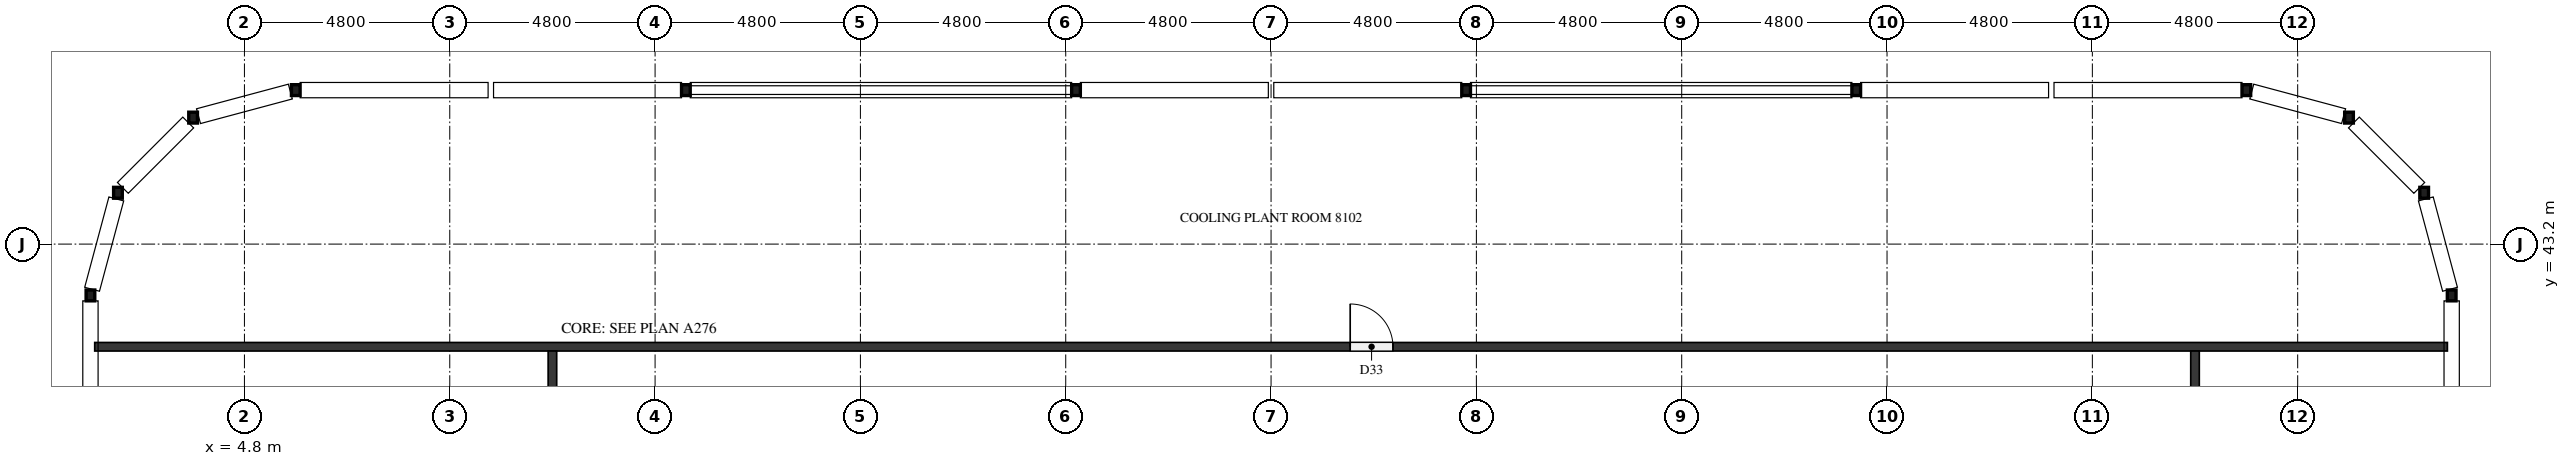
"""IFC4 building model, lengths in metres.
Left out: names, types, materials, properties, quantities, classifications, styles, units other than length and angle.
Written with IfcOpenShell. Run it as: python <this file> out.ifc"""

import sys

from ifc_helpers import new_model, si_unit, direction, frame, frame_2d, origin, origin_2d, place, context, subcontext, project, spatial, rectangle, hollow_rectangle, extrude, element, fill, save


model = new_model("IFC4")
c1 = context("Model", 3, precision=1e-05, world=origin(), true_north=direction((0.0, 1.0)))
c2 = subcontext(c1, "Body", "Model", "MODEL_VIEW")
j1 = project(units=[si_unit("LENGTHUNIT", "METRE"), si_unit("PLANEANGLEUNIT", "RADIAN")], contexts=[c1])
p1 = place(None, origin())
s1 = spatial("IfcSite", under=j1, at=p1, CompositionType="ELEMENT")
p2 = place(p1, origin())
s2 = spatial("IfcBuilding", under=s1, at=p2, CompositionType="ELEMENT")
p3 = place(p2, frame((0.0, 0.0, 314.3)))
s3 = spatial("IfcBuildingStorey", under=s2, at=p3, CompositionType="ELEMENT", Elevation=314.3)
for number, where, z_axis, x_axis in (
    (1, (56.4, 42.0, 0.0), (0.0, 0.0, 1.0), (1.0, 0.0, 0.0)),
    (2, (55.757, 44.4, 0.0), (0.0, 0.0, 1.0), (1.0, 0.0, 0.0)),
    (3, (54.0, 46.157, 0.0), (0.0, 0.0, 1.0), (1.0, 0.0, 0.0)),
    (4, (51.6, 46.8, 0.0), (0.0, 0.0, 1.0), (1.0, 0.0, 0.0)),
    (5, (42.48, 46.8, 0.0), (0.0, 0.0, 1.0), (1.0, 0.0, 0.0)),
    (6, (33.36, 46.8, 0.0), (0.0, 0.0, 1.0), (1.0, 0.0, 0.0)),
    (7, (24.24, 46.8, 0.0), (0.0, 0.0, 1.0), (1.0, 0.0, 0.0)),
    (8, (15.12, 46.8, 0.0), (0.0, 0.0, 1.0), (1.0, 0.0, 0.0)),
    (9, (6.0, 46.8, 0.0), (0.0, 0.0, 1.0), (1.0, 0.0, 0.0)),
    (10, (3.6, 46.157, 0.0), (0.0, 0.0, 1.0), (1.0, 0.0, 0.0)),
    (11, (1.843, 44.4, 0.0), (0.0, 0.0, 1.0), (1.0, 0.0, 0.0)),
    (12, (1.2, 42.0, 0.0), (0.0, 0.0, 1.0), (1.0, 0.0, 0.0)),
):
    element("IfcColumn", number, at=place(p3, frame(where, z_axis=z_axis, x_axis=x_axis)), inside=s3, PredefinedType="COLUMN", context=c2, shape_type="SweptSolid", body=[
        extrude(hollow_rectangle(XDim=0.203, YDim=0.254, WallThickness=0.01, InnerFilletRadius=0.004, OuterFilletRadius=0.013, at=origin_2d()), origin(), (0.0, 0.0, 1.0), 2.6),
    ])
p4 = place(p3, frame((1.3, 40.8, 0.0), z_axis=(0.0, 0.0, 1.0), x_axis=(1.0, 0.0, 0.0)))
e13 = element("IfcWall", 13, at=p4, inside=s3, PredefinedType="PARTITIONING", context=c2, shape_type="SweptSolid", body=[
    extrude(rectangle(XDim=55.0, YDim=0.2, at=frame_2d((27.5, 0.0))), origin(), (0.0, 0.0, 1.0), 2.6),
])
p5 = place(p4, frame((29.35, 0.0, 0.0)))
e14 = element("IfcOpeningElement", 14, at=p5, cuts=e13, PredefinedType="OPENING", context=c2, shape_type="SweptSolid", body=[
    extrude(rectangle(XDim=1.0, YDim=2.1, at=frame_2d((0.5, 1.05))), frame((0.0, 0.11, 0.0), z_axis=(0.0, -1.0, 0.0), x_axis=(1.0, 0.0, 0.0)), (0.0, 0.0, 1.0), 0.22),
])
p6 = place(p3, frame((12.0, 12.1, 0.0), z_axis=(0.0, 0.0, 1.0), x_axis=(0.0, 1.0, 0.0)))
e15 = element("IfcWall", 15, at=p6, inside=s3, PredefinedType="PARTITIONING", context=c2, shape_type="SweptSolid", body=[
    extrude(rectangle(XDim=28.6, YDim=0.2, at=frame_2d((14.3, 0.0))), origin(), (0.0, 0.0, 1.0), 2.6),
])
p7 = place(p6, frame((13.75, 0.0, 0.0)))
e16 = element("IfcOpeningElement", 16, at=p7, cuts=e15, PredefinedType="OPENING", context=c2, shape_type="SweptSolid", body=[
    extrude(rectangle(XDim=1.0, YDim=2.1, at=frame_2d((0.5, 1.05))), frame((0.0, 0.11, 0.0), z_axis=(0.0, -1.0, 0.0), x_axis=(1.0, 0.0, 0.0)), (0.0, 0.0, 1.0), 0.22),
])
p8 = place(p3, frame((50.4, 40.7, 0.0), z_axis=(0.0, 0.0, 1.0), x_axis=(0.0, -1.0, 0.0)))
e17 = element("IfcWall", 17, at=p8, inside=s3, PredefinedType="PARTITIONING", context=c2, shape_type="SweptSolid", body=[
    extrude(rectangle(XDim=28.6, YDim=0.2, at=frame_2d((14.3, 0.0))), origin(), (0.0, 0.0, 1.0), 2.6),
])
p9 = place(p8, frame((13.75, 0.0, 0.0)))
e18 = element("IfcOpeningElement", 18, at=p9, cuts=e17, PredefinedType="OPENING", context=c2, shape_type="SweptSolid", body=[
    extrude(rectangle(XDim=1.0, YDim=2.1, at=frame_2d((0.5, 1.05))), frame((0.0, 0.11, 0.0), z_axis=(0.0, -1.0, 0.0), x_axis=(1.0, 0.0, 0.0)), (0.0, 0.0, 1.0), 0.22),
])
p10 = place(p5, origin())
e19 = element("IfcDoor", 19, at=p10, inside=s3, OperationType="SINGLE_SWING_LEFT", PredefinedType="DOOR", context=c2, shape_type="SweptSolid", body=[
    extrude(rectangle(XDim=1.0, YDim=2.1, at=frame_2d((0.5, 1.05))), frame((0.0, 0.025, 0.0), z_axis=(0.0, -1.0, 0.0), x_axis=(1.0, 0.0, 0.0)), (0.0, 0.0, 1.0), 0.05),
])
fill(e14, e19)
save(model, sys.argv[1])
